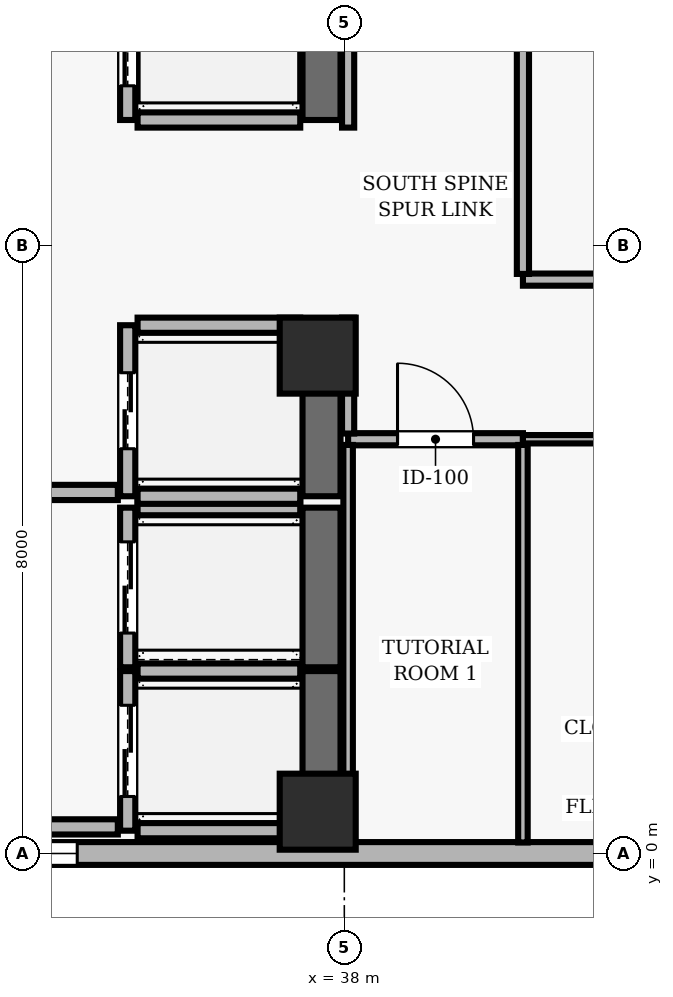
"""IFC4 building model, lengths in metres.
Left out: names, types, materials, properties, quantities, classifications, styles, units other than length and angle.
Written with IfcOpenShell. Run it as: python <this file> out.ifc"""

import sys

from ifc_helpers import new_model, si_unit, direction, frame, frame_2d, origin, origin_2d, place, context, subcontext, project, spatial, rectangle, extrude, element, fill, save


model = new_model("IFC4")
c1 = context("Model", 3, precision=1e-05, world=origin(), true_north=direction((0.0, 1.0)))
c2 = subcontext(c1, "Body", "Model", "MODEL_VIEW")
j1 = project(units=[si_unit("LENGTHUNIT", "METRE"), si_unit("PLANEANGLEUNIT", "RADIAN")], contexts=[c1])
p1 = place(None, origin())
s1 = spatial("IfcSite", under=j1, at=p1, CompositionType="ELEMENT")
p2 = place(p1, origin())
s2 = spatial("IfcBuilding", under=s1, at=p2, CompositionType="ELEMENT")
p3 = place(p2, frame((0.0, 0.0, 234.3)))
s3 = spatial("IfcBuildingStorey", under=s2, at=p3, CompositionType="ELEMENT", Elevation=234.3)
for number, where, z_axis, x_axis in (
    (1, (37.65, 0.55, 0.0), (0.0, 0.0, 1.0), (1.0, 0.0, 0.0)),
    (2, (37.65, 6.55, 0.0), (0.0, 0.0, 1.0), (1.0, 0.0, 0.0)),
):
    element("IfcColumn", number, at=place(p3, frame(where, z_axis=z_axis, x_axis=x_axis)), inside=s3, PredefinedType="COLUMN", context=c2, shape_type="SweptSolid", body=[
        extrude(rectangle(XDim=1.0, YDim=1.0, at=origin_2d()), origin(), (0.0, 0.0, 1.0), 3.9),
    ])
p4 = place(p3, frame((24.5, 0.0, 0.0), z_axis=(0.0, 0.0, 1.0), x_axis=(1.0, 0.0, 0.0)))
e3 = element("IfcWall", 3, at=p4, inside=s3, PredefinedType="SOLIDWALL", context=c2, shape_type="SweptSolid", body=[
    extrude(rectangle(XDim=38.2, YDim=0.3, at=frame_2d((19.1, 0.0))), origin(), (0.0, 0.0, 1.0), 3.64),
])
p5 = place(p4, frame((1.829, 0.0, 0.9)))
e4 = element("IfcOpeningElement", 4, at=p5, cuts=e3, PredefinedType="OPENING", context=c2, shape_type="SweptSolid", body=[
    extrude(rectangle(XDim=1.8, YDim=2.2, at=frame_2d((0.9, 1.1))), frame((0.0, 0.16, 0.0), z_axis=(0.0, -1.0, 0.0), x_axis=(1.0, 0.0, 0.0)), (0.0, 0.0, 1.0), 0.32),
])
p6 = place(p4, frame((8.186, 0.0, 0.9)))
e5 = element("IfcOpeningElement", 5, at=p6, cuts=e3, PredefinedType="OPENING", context=c2, shape_type="SweptSolid", body=[
    extrude(rectangle(XDim=1.8, YDim=2.2, at=frame_2d((0.9, 1.1))), frame((0.0, 0.16, 0.0), z_axis=(0.0, -1.0, 0.0), x_axis=(1.0, 0.0, 0.0)), (0.0, 0.0, 1.0), 0.32),
])
p7 = place(p4, frame((18.2, 0.0, 0.9)))
e6 = element("IfcOpeningElement", 6, at=p7, cuts=e3, PredefinedType="OPENING", context=c2, shape_type="SweptSolid", body=[
    extrude(rectangle(XDim=1.8, YDim=2.2, at=frame_2d((0.9, 1.1))), frame((0.0, 0.16, 0.0), z_axis=(0.0, -1.0, 0.0), x_axis=(1.0, 0.0, 0.0)), (0.0, 0.0, 1.0), 0.32),
])
p8 = place(p4, frame((23.657, 0.0, 0.9)))
e7 = element("IfcOpeningElement", 7, at=p8, cuts=e3, PredefinedType="OPENING", context=c2, shape_type="SweptSolid", body=[
    extrude(rectangle(XDim=1.8, YDim=2.2, at=frame_2d((0.9, 1.1))), frame((0.0, 0.16, 0.0), z_axis=(0.0, -1.0, 0.0), x_axis=(1.0, 0.0, 0.0)), (0.0, 0.0, 1.0), 0.32),
])
p9 = place(p4, frame((30.014, 0.0, 0.9)))
e8 = element("IfcOpeningElement", 8, at=p9, cuts=e3, PredefinedType="OPENING", context=c2, shape_type="SweptSolid", body=[
    extrude(rectangle(XDim=1.8, YDim=2.2, at=frame_2d((0.9, 1.1))), frame((0.0, 0.16, 0.0), z_axis=(0.0, -1.0, 0.0), x_axis=(1.0, 0.0, 0.0)), (0.0, 0.0, 1.0), 0.32),
])
p10 = place(p3, frame((35.15, 2.4, 0.0), z_axis=(0.0, 0.0, 1.0), x_axis=(0.0, -1.0, 0.0)))
e9 = element("IfcWall", 9, at=p10, inside=s3, PredefinedType="SOLIDWALL", context=c2, shape_type="SweptSolid", body=[
    extrude(rectangle(XDim=2.1, YDim=0.2, at=frame_2d((1.05, 0.0))), origin(), (0.0, 0.0, 1.0), 3.64),
])
p11 = place(p10, frame((0.45, 0.0, 0.0)))
e10 = element("IfcOpeningElement", 10, at=p11, cuts=e9, PredefinedType="OPENING", context=c2, shape_type="SweptSolid", body=[
    extrude(rectangle(XDim=1.2, YDim=2.15, at=frame_2d((0.6, 1.075))), frame((0.0, 0.11, 0.0), z_axis=(0.0, -1.0, 0.0), x_axis=(1.0, 0.0, 0.0)), (0.0, 0.0, 1.0), 0.22),
])
p12 = place(p3, frame((37.7, 0.3, 0.0), z_axis=(0.0, 0.0, 1.0), x_axis=(0.0, 1.0, 0.0)))
e11 = element("IfcWall", 11, at=p12, inside=s3, PredefinedType="SHEAR", context=c2, shape_type="SweptSolid", body=[
    extrude(rectangle(XDim=2.1, YDim=0.5, at=frame_2d((1.05, 0.0))), origin(), (0.0, 0.0, 1.0), 3.64),
])
for number, where, z_axis, x_axis in (
    (12, (35.28, 0.3, 0.0), (0.0, 0.0, 1.0), (1.0, 0.0, 0.0)),
    (13, (37.42, 2.4, 0.0), (0.0, 0.0, 1.0), (-1.0, 0.0, 0.0)),
):
    element("IfcWall", number, at=place(p3, frame(where, z_axis=z_axis, x_axis=x_axis)), inside=s3, PredefinedType="SOLIDWALL", context=c2, shape_type="SweptSolid", body=[
        extrude(rectangle(XDim=2.14, YDim=0.2, at=frame_2d((1.07, 0.0))), origin(), (0.0, 0.0, 1.0), 3.64),
    ])
p13 = place(p3, frame((35.15, 4.55, 0.0), z_axis=(0.0, 0.0, 1.0), x_axis=(0.0, -1.0, 0.0)))
e14 = element("IfcWall", 14, at=p13, inside=s3, PredefinedType="SOLIDWALL", context=c2, shape_type="SweptSolid", body=[
    extrude(rectangle(XDim=2.1, YDim=0.2, at=frame_2d((1.05, 0.0))), origin(), (0.0, 0.0, 1.0), 3.64),
])
p14 = place(p13, frame((0.45, 0.0, 0.0)))
e15 = element("IfcOpeningElement", 15, at=p14, cuts=e14, PredefinedType="OPENING", context=c2, shape_type="SweptSolid", body=[
    extrude(rectangle(XDim=1.2, YDim=2.15, at=frame_2d((0.6, 1.075))), frame((0.0, 0.11, 0.0), z_axis=(0.0, -1.0, 0.0), x_axis=(1.0, 0.0, 0.0)), (0.0, 0.0, 1.0), 0.22),
])
p15 = place(p3, frame((37.7, 2.45, 0.0), z_axis=(0.0, 0.0, 1.0), x_axis=(0.0, 1.0, 0.0)))
e16 = element("IfcWall", 16, at=p15, inside=s3, PredefinedType="SHEAR", context=c2, shape_type="SweptSolid", body=[
    extrude(rectangle(XDim=2.1, YDim=0.5, at=frame_2d((1.05, 0.0))), origin(), (0.0, 0.0, 1.0), 3.64),
])
p16 = place(p3, frame((37.42, 4.55, 0.0), z_axis=(0.0, 0.0, 1.0), x_axis=(-1.0, 0.0, 0.0)))
e17 = element("IfcWall", 17, at=p16, inside=s3, PredefinedType="SOLIDWALL", context=c2, shape_type="SweptSolid", body=[
    extrude(rectangle(XDim=2.14, YDim=0.2, at=frame_2d((1.07, 0.0))), origin(), (0.0, 0.0, 1.0), 3.64),
])
p17 = place(p3, frame((35.15, 6.95, 0.0), z_axis=(0.0, 0.0, 1.0), x_axis=(0.0, -1.0, 0.0)))
e18 = element("IfcWall", 18, at=p17, inside=s3, PredefinedType="SOLIDWALL", context=c2, shape_type="SweptSolid", body=[
    extrude(rectangle(XDim=2.25, YDim=0.2, at=frame_2d((1.125, 0.0))), origin(), (0.0, 0.0, 1.0), 3.64),
])
p18 = place(p17, frame((0.625, 0.0, 0.0)))
e19 = element("IfcOpeningElement", 19, at=p18, cuts=e18, PredefinedType="OPENING", context=c2, shape_type="SweptSolid", body=[
    extrude(rectangle(XDim=1.0, YDim=2.1, at=frame_2d((0.5, 1.05))), frame((0.0, 0.11, 0.0), z_axis=(0.0, -1.0, 0.0), x_axis=(1.0, 0.0, 0.0)), (0.0, 0.0, 1.0), 0.22),
])
p19 = place(p3, frame((37.7, 4.7, 0.0), z_axis=(0.0, 0.0, 1.0), x_axis=(0.0, 1.0, 0.0)))
e20 = element("IfcWall", 20, at=p19, inside=s3, PredefinedType="SHEAR", context=c2, shape_type="SweptSolid", body=[
    extrude(rectangle(XDim=2.25, YDim=0.5, at=frame_2d((1.125, 0.0))), origin(), (0.0, 0.0, 1.0), 3.64),
])
for number, where, z_axis, x_axis in (
    (21, (35.28, 4.7, 0.0), (0.0, 0.0, 1.0), (1.0, 0.0, 0.0)),
    (22, (37.42, 6.95, 0.0), (0.0, 0.0, 1.0), (-1.0, 0.0, 0.0)),
):
    element("IfcWall", number, at=place(p3, frame(where, z_axis=z_axis, x_axis=x_axis)), inside=s3, PredefinedType="SOLIDWALL", context=c2, shape_type="SweptSolid", body=[
        extrude(rectangle(XDim=2.14, YDim=0.2, at=frame_2d((1.07, 0.0))), origin(), (0.0, 0.0, 1.0), 3.64),
    ])
p20 = place(p3, frame((35.15, 11.55, 0.0), z_axis=(0.0, 0.0, 1.0), x_axis=(0.0, -1.0, 0.0)))
e23 = element("IfcWall", 23, at=p20, inside=s3, PredefinedType="SOLIDWALL", context=c2, shape_type="SweptSolid", body=[
    extrude(rectangle(XDim=1.9, YDim=0.2, at=frame_2d((0.95, 0.0))), origin(), (0.0, 0.0, 1.0), 3.64),
])
p21 = place(p20, frame((0.45, 0.0, 0.0)))
e24 = element("IfcOpeningElement", 24, at=p21, cuts=e23, PredefinedType="OPENING", context=c2, shape_type="SweptSolid", body=[
    extrude(rectangle(XDim=1.0, YDim=2.1, at=frame_2d((0.5, 1.05))), frame((0.0, 0.11, 0.0), z_axis=(0.0, -1.0, 0.0), x_axis=(1.0, 0.0, 0.0)), (0.0, 0.0, 1.0), 0.22),
])
p22 = place(p3, frame((37.7, 9.65, 0.0), z_axis=(0.0, 0.0, 1.0), x_axis=(0.0, 1.0, 0.0)))
e25 = element("IfcWall", 25, at=p22, inside=s3, PredefinedType="SHEAR", context=c2, shape_type="SweptSolid", body=[
    extrude(rectangle(XDim=1.9, YDim=0.5, at=frame_2d((0.95, 0.0))), origin(), (0.0, 0.0, 1.0), 3.64),
])
p23 = place(p3, frame((35.28, 9.65, 0.0), z_axis=(0.0, 0.0, 1.0), x_axis=(1.0, 0.0, 0.0)))
e26 = element("IfcWall", 26, at=p23, inside=s3, PredefinedType="SOLIDWALL", context=c2, shape_type="SweptSolid", body=[
    extrude(rectangle(XDim=2.14, YDim=0.2, at=frame_2d((1.07, 0.0))), origin(), (0.0, 0.0, 1.0), 3.64),
])
p24 = place(p3, frame((31.65, 0.35, 0.0), z_axis=(0.0, 0.0, 1.0), x_axis=(1.0, 0.0, 0.0)))
e27 = element("IfcWall", 27, at=p24, inside=s3, PredefinedType="SOLIDWALL", context=c2, shape_type="SweptSolid", body=[
    extrude(rectangle(XDim=3.37, YDim=0.2, at=frame_2d((1.685, 0.0))), origin(), (0.0, 0.0, 1.0), 3.64),
])
p25 = place(p3, frame((35.02, 4.75, 0.0), z_axis=(0.0, 0.0, 1.0), x_axis=(-1.0, 0.0, 0.0)))
e28 = element("IfcWall", 28, at=p25, inside=s3, PredefinedType="SOLIDWALL", context=c2, shape_type="SweptSolid", body=[
    extrude(rectangle(XDim=3.11, YDim=0.2, at=frame_2d((1.555, 0.0))), origin(), (0.0, 0.0, 1.0), 3.64),
])
p26 = place(p25, frame((1.03, 0.0, 0.0)))
e29 = element("IfcOpeningElement", 29, at=p26, cuts=e28, PredefinedType="OPENING", context=c2, shape_type="SweptSolid", body=[
    extrude(rectangle(XDim=1.05, YDim=2.15, at=frame_2d((0.525, 1.075))), frame((0.0, 0.11, 0.0), z_axis=(0.0, -1.0, 0.0), x_axis=(1.0, 0.0, 0.0)), (0.0, 0.0, 1.0), 0.22),
])
p27 = place(p3, frame((38.05, 5.45, 0.0), z_axis=(0.0, 0.0, 1.0), x_axis=(1.0, 0.0, 0.0)))
e30 = element("IfcWall", 30, at=p27, inside=s3, PredefinedType="PARTITIONING", context=c2, shape_type="SweptSolid", body=[
    extrude(rectangle(XDim=2.3, YDim=0.16, at=frame_2d((1.15, 0.0))), origin(), (0.0, 0.0, 1.0), 3.322),
])
p28 = place(p27, frame((0.65, 0.0, 0.0)))
e31 = element("IfcOpeningElement", 31, at=p28, cuts=e30, PredefinedType="OPENING", context=c2, shape_type="SweptSolid", body=[
    extrude(rectangle(XDim=1.0, YDim=2.1, at=frame_2d((0.5, 1.05))), frame((0.0, 0.09, 0.0), z_axis=(0.0, -1.0, 0.0), x_axis=(1.0, 0.0, 0.0)), (0.0, 0.0, 1.0), 0.18),
])
p29 = place(p3, frame((40.35, 5.45, 0.0), z_axis=(0.0, 0.0, 1.0), x_axis=(1.0, 0.0, 0.0)))
e32 = element("IfcWall", 32, at=p29, inside=s3, PredefinedType="MOVABLE", context=c2, shape_type="SweptSolid", body=[
    extrude(rectangle(XDim=5.65, YDim=0.11, at=frame_2d((2.825, 0.0))), origin(), (0.0, 0.0, 1.0), 3.322),
])
p30 = place(p29, frame((2.375, 0.0, 0.0)))
e33 = element("IfcOpeningElement", 33, at=p30, cuts=e32, PredefinedType="OPENING", context=c2, shape_type="SweptSolid", body=[
    extrude(rectangle(XDim=0.9, YDim=2.1, at=frame_2d((0.45, 1.05))), frame((0.0, 0.065, 0.0), z_axis=(0.0, -1.0, 0.0), x_axis=(1.0, 0.0, 0.0)), (0.0, 0.0, 1.0), 0.13),
])
p31 = place(p3, frame((46.0, 7.55, 0.0), z_axis=(0.0, 0.0, 1.0), x_axis=(-1.0, 0.0, 0.0)))
e34 = element("IfcWall", 34, at=p31, inside=s3, PredefinedType="PARTITIONING", context=c2, shape_type="SweptSolid", body=[
    extrude(rectangle(XDim=5.65, YDim=0.16, at=frame_2d((2.825, 0.0))), origin(), (0.0, 0.0, 1.0), 3.096),
])
p32 = place(p3, frame((38.05, 5.375, 0.0), z_axis=(0.0, 0.0, 1.0), x_axis=(0.0, -1.0, 0.0)))
e35 = element("IfcWall", 35, at=p32, inside=s3, PredefinedType="PARTITIONING", context=c2, shape_type="SweptSolid", body=[
    extrude(rectangle(XDim=5.23, YDim=0.125, at=frame_2d((2.615, 0.0))), origin(), (0.0, 0.0, 1.0), 3.096),
])
p33 = place(p3, frame((38.05, 7.05, 0.0), z_axis=(0.0, 0.0, 1.0), x_axis=(0.0, -1.0, 0.0)))
e36 = element("IfcWall", 36, at=p33, inside=s3, PredefinedType="PARTITIONING", context=c2, shape_type="SweptSolid", body=[
    extrude(rectangle(XDim=1.525, YDim=0.16, at=frame_2d((0.763, 0.0))), origin(), (0.0, 0.0, 1.0), 3.096),
])
p34 = place(p3, frame((38.05, 15.925, 0.0), z_axis=(0.0, 0.0, 1.0), x_axis=(0.0, -1.0, 0.0)))
e37 = element("IfcWall", 37, at=p34, inside=s3, PredefinedType="PARTITIONING", context=c2, shape_type="SweptSolid", body=[
    extrude(rectangle(XDim=6.375, YDim=0.16, at=frame_2d((3.188, 0.0))), origin(), (0.0, 0.0, 1.0), 3.096),
])
p35 = place(p3, frame((40.35, 0.145, 0.0), z_axis=(0.0, 0.0, 1.0), x_axis=(0.0, 1.0, 0.0)))
e38 = element("IfcWall", 38, at=p35, inside=s3, PredefinedType="PARTITIONING", context=c2, shape_type="SweptSolid", body=[
    extrude(rectangle(XDim=5.23, YDim=0.125, at=frame_2d((2.615, 0.0))), origin(), (0.0, 0.0, 1.0), 3.64),
])
p36 = place(p3, frame((40.35, 7.625, 0.0), z_axis=(0.0, 0.0, 1.0), x_axis=(0.0, 1.0, 0.0)))
e39 = element("IfcWall", 39, at=p36, inside=s3, PredefinedType="PARTITIONING", context=c2, shape_type="SweptSolid", body=[
    extrude(rectangle(XDim=8.3, YDim=0.16, at=frame_2d((4.15, 0.0))), origin(), (0.0, 0.0, 1.0), 3.64),
])
p37 = place(p36, frame((3.65, 0.0, 0.0)))
e40 = element("IfcOpeningElement", 40, at=p37, cuts=e39, PredefinedType="OPENING", context=c2, shape_type="SweptSolid", body=[
    extrude(rectangle(XDim=1.0, YDim=2.1, at=frame_2d((0.5, 1.05))), frame((0.0, 0.09, 0.0), z_axis=(0.0, -1.0, 0.0), x_axis=(1.0, 0.0, 0.0)), (0.0, 0.0, 1.0), 0.18),
])
p38 = place(p6, origin())
e41 = element("IfcWindow", 41, at=p38, inside=s3, PartitioningType="SINGLE_PANEL", PredefinedType="WINDOW", context=c2, shape_type="SweptSolid", body=[
    extrude(rectangle(XDim=1.8, YDim=2.2, at=frame_2d((0.9, 1.1))), frame((0.0, 0.03, 0.0), z_axis=(0.0, -1.0, 0.0), x_axis=(1.0, 0.0, 0.0)), (0.0, 0.0, 1.0), 0.06),
])
fill(e5, e41)
p39 = place(p11, origin())
e42 = element("IfcDoor", 42, at=p39, inside=s3, OperationType="DOUBLE_DOOR_SLIDING", PredefinedType="DOOR", context=c2, shape_type="SweptSolid", body=[
    extrude(rectangle(XDim=1.2, YDim=2.15, at=frame_2d((0.6, 1.075))), frame((0.0, 0.025, 0.0), z_axis=(0.0, -1.0, 0.0), x_axis=(1.0, 0.0, 0.0)), (0.0, 0.0, 1.0), 0.05),
])
fill(e10, e42)
p40 = place(p14, origin())
e43 = element("IfcDoor", 43, at=p40, inside=s3, OperationType="DOUBLE_DOOR_SLIDING", PredefinedType="DOOR", context=c2, shape_type="SweptSolid", body=[
    extrude(rectangle(XDim=1.2, YDim=2.15, at=frame_2d((0.6, 1.075))), frame((0.0, 0.025, 0.0), z_axis=(0.0, -1.0, 0.0), x_axis=(1.0, 0.0, 0.0)), (0.0, 0.0, 1.0), 0.05),
])
fill(e15, e43)
p41 = place(p18, origin())
e44 = element("IfcDoor", 44, at=p41, inside=s3, OperationType="DOUBLE_DOOR_SLIDING", PredefinedType="DOOR", context=c2, shape_type="SweptSolid", body=[
    extrude(rectangle(XDim=1.0, YDim=2.1, at=frame_2d((0.5, 1.05))), frame((0.0, 0.025, 0.0), z_axis=(0.0, -1.0, 0.0), x_axis=(1.0, 0.0, 0.0)), (0.0, 0.0, 1.0), 0.05),
])
fill(e19, e44)
p42 = place(p21, origin())
e45 = element("IfcDoor", 45, at=p42, inside=s3, OperationType="DOUBLE_DOOR_SLIDING", PredefinedType="DOOR", context=c2, shape_type="SweptSolid", body=[
    extrude(rectangle(XDim=1.0, YDim=2.1, at=frame_2d((0.5, 1.05))), frame((0.0, 0.025, 0.0), z_axis=(0.0, -1.0, 0.0), x_axis=(1.0, 0.0, 0.0)), (0.0, 0.0, 1.0), 0.05),
])
fill(e24, e45)
p43 = place(p28, origin())
e46 = element("IfcDoor", 46, at=p43, inside=s3, OperationType="SINGLE_SWING_LEFT", PredefinedType="DOOR", context=c2, shape_type="SweptSolid", body=[
    extrude(rectangle(XDim=1.0, YDim=2.1, at=frame_2d((0.5, 1.05))), frame((0.0, 0.025, 0.0), z_axis=(0.0, -1.0, 0.0), x_axis=(1.0, 0.0, 0.0)), (0.0, 0.0, 1.0), 0.05),
])
fill(e31, e46)
save(model, sys.argv[1])
